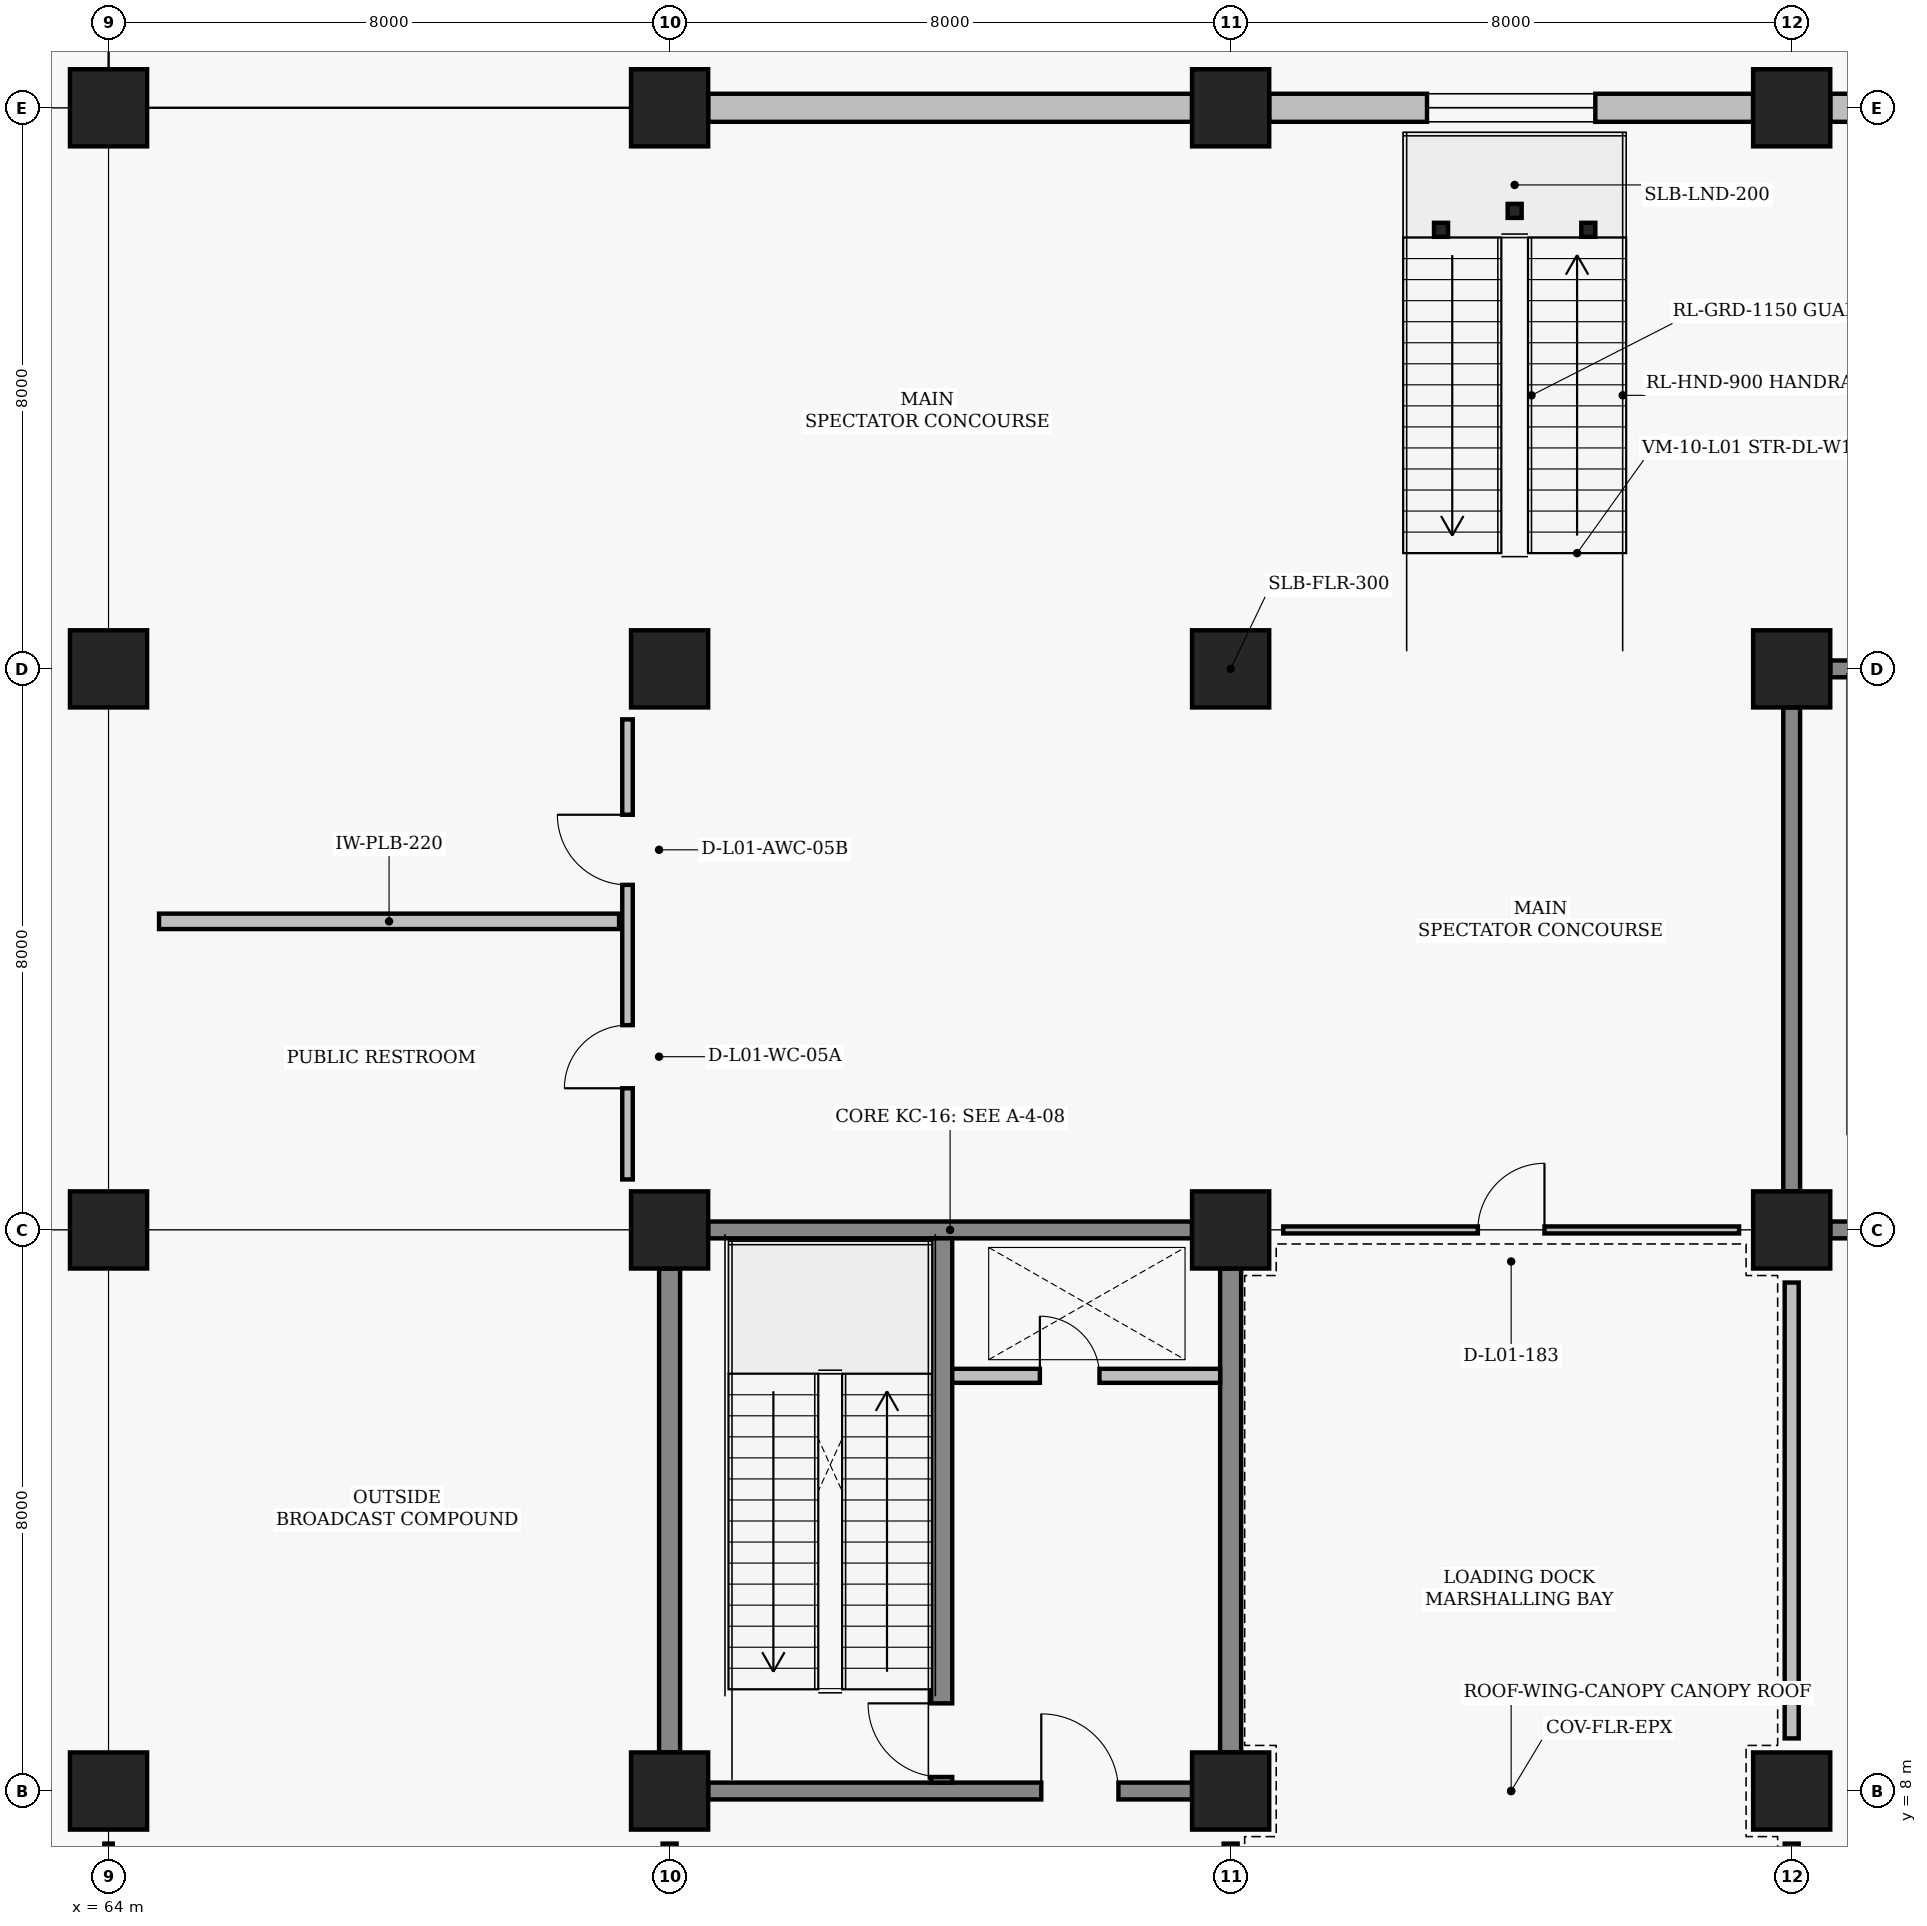
"""IFC4 building model, lengths in metres.
Left out: names, types, materials, properties, quantities, classifications, styles, units other than length and angle.
Written with IfcOpenShell. Run it as: python <this file> out.ifc"""

import sys

from ifc_helpers import new_model, si_unit, direction, frame, frame_2d, origin, origin_2d, place, context, subcontext, project, spatial, rectangle, hollow_rectangle, extrude, element, fill, save


model = new_model("IFC4")
c1 = context("Model", 3, precision=1e-05, world=origin(), true_north=direction((0.0, 1.0)))
c2 = subcontext(c1, "Body", "Model", "MODEL_VIEW")
j1 = project(units=[si_unit("LENGTHUNIT", "METRE"), si_unit("PLANEANGLEUNIT", "RADIAN")], contexts=[c1])
p1 = place(None, origin())
s1 = spatial("IfcSite", under=j1, at=p1, CompositionType="ELEMENT")
p2 = place(p1, origin())
s2 = spatial("IfcBuilding", under=s1, at=p2, CompositionType="ELEMENT")
p3 = place(p2, origin())
s3 = spatial("IfcBuildingStorey", under=s2, at=p3, CompositionType="ELEMENT", Elevation=0.0)
for number, where, z_axis, x_axis in (
    (1, (64.0, 8.0, 0.0), (0.0, 0.0, 1.0), (1.0, 0.0, 0.0)),
    (2, (64.0, 16.0, 0.0), (0.0, 0.0, 1.0), (1.0, 0.0, 0.0)),
    (3, (64.0, 24.0, 0.0), (0.0, 0.0, 1.0), (1.0, 0.0, 0.0)),
    (4, (64.0, 32.0, 0.0), (0.0, 0.0, 1.0), (1.0, 0.0, 0.0)),
    (5, (72.0, 8.0, 0.0), (0.0, 0.0, 1.0), (1.0, 0.0, 0.0)),
    (6, (72.0, 16.0, 0.0), (0.0, 0.0, 1.0), (1.0, 0.0, 0.0)),
    (7, (72.0, 24.0, 0.0), (0.0, 0.0, 1.0), (1.0, 0.0, 0.0)),
    (8, (72.0, 32.0, 0.0), (0.0, 0.0, 1.0), (1.0, 0.0, 0.0)),
    (9, (80.0, 8.0, 0.0), (0.0, 0.0, 1.0), (1.0, 0.0, 0.0)),
    (10, (80.0, 16.0, 0.0), (0.0, 0.0, 1.0), (1.0, 0.0, 0.0)),
    (11, (80.0, 24.0, 0.0), (0.0, 0.0, 1.0), (1.0, 0.0, 0.0)),
    (12, (80.0, 32.0, 0.0), (0.0, 0.0, 1.0), (1.0, 0.0, 0.0)),
    (13, (88.0, 8.0, 0.0), (0.0, 0.0, 1.0), (1.0, 0.0, 0.0)),
    (14, (88.0, 16.0, 0.0), (0.0, 0.0, 1.0), (1.0, 0.0, 0.0)),
    (15, (88.0, 24.0, 0.0), (0.0, 0.0, 1.0), (1.0, 0.0, 0.0)),
    (16, (88.0, 32.0, 0.0), (0.0, 0.0, 1.0), (1.0, 0.0, 0.0)),
):
    element("IfcColumn", number, at=place(p3, frame(where, z_axis=z_axis, x_axis=x_axis)), inside=s3, PredefinedType="COLUMN", context=c2, shape_type="SweptSolid", body=[
        extrude(rectangle(XDim=1.1, YDim=1.1, at=origin_2d()), origin(), (0.0, 0.0, 1.0), 4.8),
    ])
p4 = place(p3, frame((72.55, 32.0, 0.0), z_axis=(0.0, 0.0, 1.0), x_axis=(1.0, 0.0, 0.0)))
e17 = element("IfcWall", 17, at=p4, inside=s3, PredefinedType="SOLIDWALL", context=c2, shape_type="SweptSolid", body=[
    extrude(rectangle(XDim=6.9, YDim=0.4, at=frame_2d((3.45, 0.0))), origin(), (0.0, 0.0, 1.0), 3.81),
])
p5 = place(p3, frame((80.55, 32.0, 0.0), z_axis=(0.0, 0.0, 1.0), x_axis=(1.0, 0.0, 0.0)))
e18 = element("IfcWall", 18, at=p5, inside=s3, PredefinedType="SOLIDWALL", context=c2, shape_type="SweptSolid", body=[
    extrude(rectangle(XDim=6.9, YDim=0.4, at=frame_2d((3.45, 0.0))), origin(), (0.0, 0.0, 1.0), 3.81),
])
p6 = place(p5, frame((2.25, 0.0, 0.95)))
e19 = element("IfcOpeningElement", 19, at=p6, cuts=e18, PredefinedType="OPENING", context=c2, shape_type="SweptSolid", body=[
    extrude(rectangle(XDim=2.4, YDim=2.0, at=frame_2d((1.2, 1.0))), frame((0.0, 0.21, 0.0), z_axis=(0.0, -1.0, 0.0), x_axis=(1.0, 0.0, 0.0)), (0.0, 0.0, 1.0), 0.42),
])
p7 = place(p3, frame((88.55, 32.0, 0.0), z_axis=(0.0, 0.0, 1.0), x_axis=(1.0, 0.0, 0.0)))
e20 = element("IfcWall", 20, at=p7, inside=s3, PredefinedType="SOLIDWALL", context=c2, shape_type="SweptSolid", body=[
    extrude(rectangle(XDim=6.9, YDim=0.4, at=frame_2d((3.45, 0.0))), origin(), (0.0, 0.0, 1.0), 3.81),
])
p8 = place(p3, frame((88.55, 16.0, 0.0), z_axis=(0.0, 0.0, 1.0), x_axis=(1.0, 0.0, 0.0)))
e21 = element("IfcWall", 21, at=p8, inside=s3, PredefinedType="SHEAR", context=c2, shape_type="SweptSolid", body=[
    extrude(rectangle(XDim=6.9, YDim=0.24, at=frame_2d((3.45, 0.0))), origin(), (0.0, 0.0, 1.0), 2.34),
])
p9 = place(p8, frame((4.75, 0.0, 0.0)))
e22 = element("IfcOpeningElement", 22, at=p9, cuts=e21, PredefinedType="OPENING", context=c2, shape_type="SweptSolid", body=[
    extrude(rectangle(XDim=1.1, YDim=2.2, at=frame_2d((0.55, 1.1))), frame((0.0, 0.13, 0.0), z_axis=(0.0, -1.0, 0.0), x_axis=(1.0, 0.0, 0.0)), (0.0, 0.0, 1.0), 0.26),
])
p10 = place(p3, frame((88.55, 24.0, 0.0), z_axis=(0.0, 0.0, 1.0), x_axis=(1.0, 0.0, 0.0)))
e23 = element("IfcWall", 23, at=p10, inside=s3, PredefinedType="SHEAR", context=c2, shape_type="SweptSolid", body=[
    extrude(rectangle(XDim=6.9, YDim=0.24, at=frame_2d((3.45, 0.0))), origin(), (0.0, 0.0, 1.0), 3.66),
])
p11 = place(p3, frame((88.0, 16.55, 0.0), z_axis=(0.0, 0.0, 1.0), x_axis=(0.0, 1.0, 0.0)))
e24 = element("IfcWall", 24, at=p11, inside=s3, PredefinedType="SHEAR", context=c2, shape_type="SweptSolid", body=[
    extrude(rectangle(XDim=6.9, YDim=0.24, at=frame_2d((3.45, 0.0))), origin(), (0.0, 0.0, 1.0), 2.34),
])
p12 = place(p3, frame((72.55, 8.0, 0.0), z_axis=(0.0, 0.0, 1.0), x_axis=(1.0, 0.0, 0.0)))
e25 = element("IfcWall", 25, at=p12, inside=s3, PredefinedType="SHEAR", context=c2, shape_type="SweptSolid", body=[
    extrude(rectangle(XDim=6.9, YDim=0.24, at=frame_2d((3.45, 0.0))), origin(), (0.0, 0.0, 1.0), 3.81),
])
p13 = place(p12, frame((4.75, 0.0, 0.0)))
e26 = element("IfcOpeningElement", 26, at=p13, cuts=e25, PredefinedType="OPENING", context=c2, shape_type="SweptSolid", body=[
    extrude(rectangle(XDim=1.1, YDim=2.2, at=frame_2d((0.55, 1.1))), frame((0.0, 0.13, 0.0), z_axis=(0.0, -1.0, 0.0), x_axis=(1.0, 0.0, 0.0)), (0.0, 0.0, 1.0), 0.26),
])
p14 = place(p3, frame((72.55, 16.0, 0.0), z_axis=(0.0, 0.0, 1.0), x_axis=(1.0, 0.0, 0.0)))
e27 = element("IfcWall", 27, at=p14, inside=s3, PredefinedType="SHEAR", context=c2, shape_type="SweptSolid", body=[
    extrude(rectangle(XDim=6.9, YDim=0.24, at=frame_2d((3.45, 0.0))), origin(), (0.0, 0.0, 1.0), 2.34),
])
for number, where, z_axis, x_axis in (
    (28, (72.0, 8.55, 0.0), (0.0, 0.0, 1.0), (0.0, 1.0, 0.0)),
    (29, (80.0, 8.55, 0.0), (0.0, 0.0, 1.0), (0.0, 1.0, 0.0)),
):
    element("IfcWall", number, at=place(p3, frame(where, z_axis=z_axis, x_axis=x_axis)), inside=s3, PredefinedType="SHEAR", context=c2, shape_type="SweptSolid", body=[
        extrude(rectangle(XDim=6.9, YDim=0.3, at=frame_2d((3.45, 0.0))), origin(), (0.0, 0.0, 1.0), 2.34),
    ])
p15 = place(p3, frame((75.88, 8.12, 0.0), z_axis=(0.0, 0.0, 1.0), x_axis=(0.0, 1.0, 0.0)))
e30 = element("IfcWall", 30, at=p15, inside=s3, PredefinedType="SHEAR", context=c2, shape_type="SweptSolid", body=[
    extrude(rectangle(XDim=7.76, YDim=0.3, at=frame_2d((3.88, 0.0))), origin(), (0.0, 0.0, 1.0), 2.34),
])
p16 = place(p15, frame((0.08, 0.0, 0.0)))
e31 = element("IfcOpeningElement", 31, at=p16, cuts=e30, PredefinedType="OPENING", context=c2, shape_type="SweptSolid", body=[
    extrude(rectangle(XDim=1.05, YDim=2.15, at=frame_2d((0.525, 1.075))), frame((0.0, 0.16, 0.0), z_axis=(0.0, -1.0, 0.0), x_axis=(1.0, 0.0, 0.0)), (0.0, 0.0, 1.0), 0.32),
])
p17 = place(p3, frame((76.03, 13.92, 0.0), z_axis=(0.0, 0.0, 1.0), x_axis=(1.0, 0.0, 0.0)))
e32 = element("IfcWall", 32, at=p17, inside=s3, PredefinedType="PARTITIONING", context=c2, shape_type="SweptSolid", body=[
    extrude(rectangle(XDim=3.82, YDim=0.2, at=frame_2d((1.91, 0.0))), origin(), (0.0, 0.0, 1.0), 3.81),
])
p18 = place(p17, frame((1.25, 0.0, 0.0)))
e33 = element("IfcOpeningElement", 33, at=p18, cuts=e32, PredefinedType="OPENING", context=c2, shape_type="SweptSolid", body=[
    extrude(rectangle(XDim=0.85, YDim=2.05, at=frame_2d((0.425, 1.025))), frame((0.0, 0.11, 0.0), z_axis=(0.0, -1.0, 0.0), x_axis=(1.0, 0.0, 0.0)), (0.0, 0.0, 1.0), 0.22),
])
for number, where, z_axis, x_axis in (
    (34, (83.0, 30.26, 0.0), (0.0, 0.0, 1.0), (1.0, 0.0, 0.0)),
    (35, (85.1, 30.26, 0.0), (0.0, 0.0, 1.0), (1.0, 0.0, 0.0)),
    (36, (84.05, 30.53, 0.0), (0.0, 0.0, 1.0), (1.0, 0.0, 0.0)),
):
    element("IfcColumn", number, at=place(p3, frame(where, z_axis=z_axis, x_axis=x_axis)), inside=s3, PredefinedType="COLUMN", context=c2, shape_type="SweptSolid", body=[
        extrude(hollow_rectangle(XDim=0.2, YDim=0.2, WallThickness=0.009, at=origin_2d()), origin(), (0.0, 0.0, 1.0), 2.2),
    ])
p19 = place(p3, frame((88.0, 0.75, 0.0), z_axis=(0.0, 0.0, 1.0), x_axis=(0.0, 1.0, 0.0)))
e37 = element("IfcWall", 37, at=p19, inside=s3, PredefinedType="PARTITIONING", context=c2, shape_type="SweptSolid", body=[
    extrude(rectangle(XDim=6.5, YDim=0.2, at=frame_2d((3.25, 0.0))), origin(), (0.0, 0.0, 1.0), 3.81),
])
p20 = place(p19, frame((2.7, 0.0, 0.0)))
e38 = element("IfcOpeningElement", 38, at=p20, cuts=e37, PredefinedType="OPENING", context=c2, shape_type="SweptSolid", body=[
    extrude(rectangle(XDim=1.1, YDim=2.2, at=frame_2d((0.55, 1.1))), frame((0.0, 0.11, 0.0), z_axis=(0.0, -1.0, 0.0), x_axis=(1.0, 0.0, 0.0)), (0.0, 0.0, 1.0), 0.22),
])
p21 = place(p3, frame((88.0, 8.75, 0.0), z_axis=(0.0, 0.0, 1.0), x_axis=(0.0, 1.0, 0.0)))
e39 = element("IfcWall", 39, at=p21, inside=s3, PredefinedType="PARTITIONING", context=c2, shape_type="SweptSolid", body=[
    extrude(rectangle(XDim=6.5, YDim=0.2, at=frame_2d((3.25, 0.0))), origin(), (0.0, 0.0, 1.0), 3.81),
])
p22 = place(p3, frame((72.0, 0.75, 0.0), z_axis=(0.0, 0.0, 1.0), x_axis=(0.0, 1.0, 0.0)))
e40 = element("IfcWall", 40, at=p22, inside=s3, PredefinedType="PARTITIONING", context=c2, shape_type="SweptSolid", body=[
    extrude(rectangle(XDim=6.5, YDim=0.2, at=frame_2d((3.25, 0.0))), origin(), (0.0, 0.0, 1.0), 3.81),
])
p23 = place(p22, frame((2.7, 0.0, 0.0)))
e41 = element("IfcOpeningElement", 41, at=p23, cuts=e40, PredefinedType="OPENING", context=c2, shape_type="SweptSolid", body=[
    extrude(rectangle(XDim=1.1, YDim=2.2, at=frame_2d((0.55, 1.1))), frame((0.0, 0.11, 0.0), z_axis=(0.0, -1.0, 0.0), x_axis=(1.0, 0.0, 0.0)), (0.0, 0.0, 1.0), 0.22),
])
p24 = place(p3, frame((80.0, 0.75, 0.0), z_axis=(0.0, 0.0, 1.0), x_axis=(0.0, 1.0, 0.0)))
e42 = element("IfcWall", 42, at=p24, inside=s3, PredefinedType="PARTITIONING", context=c2, shape_type="SweptSolid", body=[
    extrude(rectangle(XDim=6.5, YDim=0.2, at=frame_2d((3.25, 0.0))), origin(), (0.0, 0.0, 1.0), 3.81),
])
p25 = place(p3, frame((64.72, 20.4, 0.0), z_axis=(0.0, 0.0, 1.0), x_axis=(1.0, 0.0, 0.0)))
e43 = element("IfcWall", 43, at=p25, inside=s3, PredefinedType="PLUMBINGWALL", context=c2, shape_type="SweptSolid", body=[
    extrude(rectangle(XDim=6.56, YDim=0.22, at=frame_2d((3.28, 0.0))), origin(), (0.0, 0.0, 1.0), 4.11),
])
p26 = place(p3, frame((71.4, 16.72, 0.0), z_axis=(0.0, 0.0, 1.0), x_axis=(0.0, 1.0, 0.0)))
e44 = element("IfcWall", 44, at=p26, inside=s3, PredefinedType="PARTITIONING", context=c2, shape_type="SweptSolid", body=[
    extrude(rectangle(XDim=6.56, YDim=0.15, at=frame_2d((3.28, 0.0))), origin(), (0.0, 0.0, 1.0), 3.66),
])
p27 = place(p26, frame((1.3, 0.0, 0.0)))
e45 = element("IfcOpeningElement", 45, at=p27, cuts=e44, PredefinedType="OPENING", context=c2, shape_type="SweptSolid", body=[
    extrude(rectangle(XDim=0.9, YDim=2.1, at=frame_2d((0.45, 1.05))), frame((0.0, 0.085, 0.0), z_axis=(0.0, -1.0, 0.0), x_axis=(1.0, 0.0, 0.0)), (0.0, 0.0, 1.0), 0.17),
])
p28 = place(p26, frame((4.2, 0.0, 0.0)))
e46 = element("IfcOpeningElement", 46, at=p28, cuts=e44, PredefinedType="OPENING", context=c2, shape_type="SweptSolid", body=[
    extrude(rectangle(XDim=1.0, YDim=2.15, at=frame_2d((0.5, 1.075))), frame((0.0, 0.085, 0.0), z_axis=(0.0, -1.0, 0.0), x_axis=(1.0, 0.0, 0.0)), (0.0, 0.0, 1.0), 0.17),
])
p29 = place(p3, frame((64.0, 0.75, 0.0), z_axis=(0.0, 0.0, 1.0), x_axis=(0.0, 1.0, 0.0)))
e47 = element("IfcWall", 47, at=p29, inside=s3, PredefinedType="PARTITIONING", context=c2, shape_type="SweptSolid", body=[
    extrude(rectangle(XDim=6.5, YDim=0.12, at=frame_2d((3.25, 0.0))), origin(), (0.0, 0.0, 1.0), 3.81),
])
p30 = place(p29, frame((2.75, 0.0, 0.0)))
e48 = element("IfcOpeningElement", 48, at=p30, cuts=e47, PredefinedType="OPENING", context=c2, shape_type="SweptSolid", body=[
    extrude(rectangle(XDim=1.0, YDim=2.1, at=frame_2d((0.5, 1.05))), frame((0.0, 0.07, 0.0), z_axis=(0.0, -1.0, 0.0), x_axis=(1.0, 0.0, 0.0)), (0.0, 0.0, 1.0), 0.14),
])
p31 = place(p3, frame((80.75, 16.0, 0.0), z_axis=(0.0, 0.0, 1.0), x_axis=(1.0, 0.0, 0.0)))
e49 = element("IfcWall", 49, at=p31, inside=s3, PredefinedType="PARTITIONING", context=c2, shape_type="SweptSolid", body=[
    extrude(rectangle(XDim=6.5, YDim=0.1, at=frame_2d((3.25, 0.0))), origin(), (0.0, 0.0, 1.0), 2.34),
])
p32 = place(p31, frame((2.775, 0.0, 0.0)))
e50 = element("IfcOpeningElement", 50, at=p32, cuts=e49, PredefinedType="OPENING", context=c2, shape_type="SweptSolid", body=[
    extrude(rectangle(XDim=0.95, YDim=2.1, at=frame_2d((0.475, 1.05))), frame((0.0, 0.06, 0.0), z_axis=(0.0, -1.0, 0.0), x_axis=(1.0, 0.0, 0.0)), (0.0, 0.0, 1.0), 0.12),
])
p33 = place(p6, origin())
e51 = element("IfcWindow", 51, at=p33, inside=s3, PartitioningType="SINGLE_PANEL", PredefinedType="WINDOW", context=c2, shape_type="SweptSolid", body=[
    extrude(rectangle(XDim=2.4, YDim=2.0, at=frame_2d((1.2, 1.0))), frame((0.0, 0.03, 0.0), z_axis=(0.0, -1.0, 0.0), x_axis=(1.0, 0.0, 0.0)), (0.0, 0.0, 1.0), 0.06),
])
fill(e19, e51)
p34 = place(p13, origin())
e52 = element("IfcDoor", 52, at=p34, inside=s3, OperationType="SINGLE_SWING_LEFT", PredefinedType="DOOR", context=c2, shape_type="SweptSolid", body=[
    extrude(rectangle(XDim=1.1, YDim=2.2, at=frame_2d((0.55, 1.1))), frame((0.0, 0.025, 0.0), z_axis=(0.0, -1.0, 0.0), x_axis=(1.0, 0.0, 0.0)), (0.0, 0.0, 1.0), 0.05),
])
fill(e26, e52)
p35 = place(p16, origin())
e53 = element("IfcDoor", 53, at=p35, inside=s3, OperationType="SINGLE_SWING_RIGHT", PredefinedType="DOOR", context=c2, shape_type="SweptSolid", body=[
    extrude(rectangle(XDim=1.05, YDim=2.15, at=frame_2d((0.525, 1.075))), frame((0.0, 0.025, 0.0), z_axis=(0.0, -1.0, 0.0), x_axis=(1.0, 0.0, 0.0)), (0.0, 0.0, 1.0), 0.05),
])
fill(e31, e53)
p36 = place(p18, origin())
e54 = element("IfcDoor", 54, at=p36, inside=s3, OperationType="SINGLE_SWING_LEFT", PredefinedType="TRAPDOOR", context=c2, shape_type="SweptSolid", body=[
    extrude(rectangle(XDim=0.85, YDim=2.05, at=frame_2d((0.425, 1.025))), frame((0.0, 0.025, 0.0), z_axis=(0.0, -1.0, 0.0), x_axis=(1.0, 0.0, 0.0)), (0.0, 0.0, 1.0), 0.05),
])
fill(e33, e54)
p37 = place(p27, origin())
e55 = element("IfcDoor", 55, at=p37, inside=s3, OperationType="SINGLE_SWING_LEFT", PredefinedType="DOOR", context=c2, shape_type="SweptSolid", body=[
    extrude(rectangle(XDim=0.9, YDim=2.1, at=frame_2d((0.45, 1.05))), frame((0.0, 0.025, 0.0), z_axis=(0.0, -1.0, 0.0), x_axis=(1.0, 0.0, 0.0)), (0.0, 0.0, 1.0), 0.05),
])
fill(e45, e55)
p38 = place(p28, origin())
e56 = element("IfcDoor", 56, at=p38, inside=s3, OperationType="SINGLE_SWING_RIGHT", PredefinedType="DOOR", context=c2, shape_type="SweptSolid", body=[
    extrude(rectangle(XDim=1.0, YDim=2.15, at=frame_2d((0.5, 1.075))), frame((0.0, 0.025, 0.0), z_axis=(0.0, -1.0, 0.0), x_axis=(1.0, 0.0, 0.0)), (0.0, 0.0, 1.0), 0.05),
])
fill(e46, e56)
p39 = place(p32, origin())
e57 = element("IfcDoor", 57, at=p39, inside=s3, OperationType="SINGLE_SWING_RIGHT", PredefinedType="DOOR", context=c2, shape_type="SweptSolid", body=[
    extrude(rectangle(XDim=0.95, YDim=2.1, at=frame_2d((0.475, 1.05))), frame((0.0, 0.025, 0.0), z_axis=(0.0, -1.0, 0.0), x_axis=(1.0, 0.0, 0.0)), (0.0, 0.0, 1.0), 0.05),
])
fill(e50, e57)
save(model, sys.argv[1])
